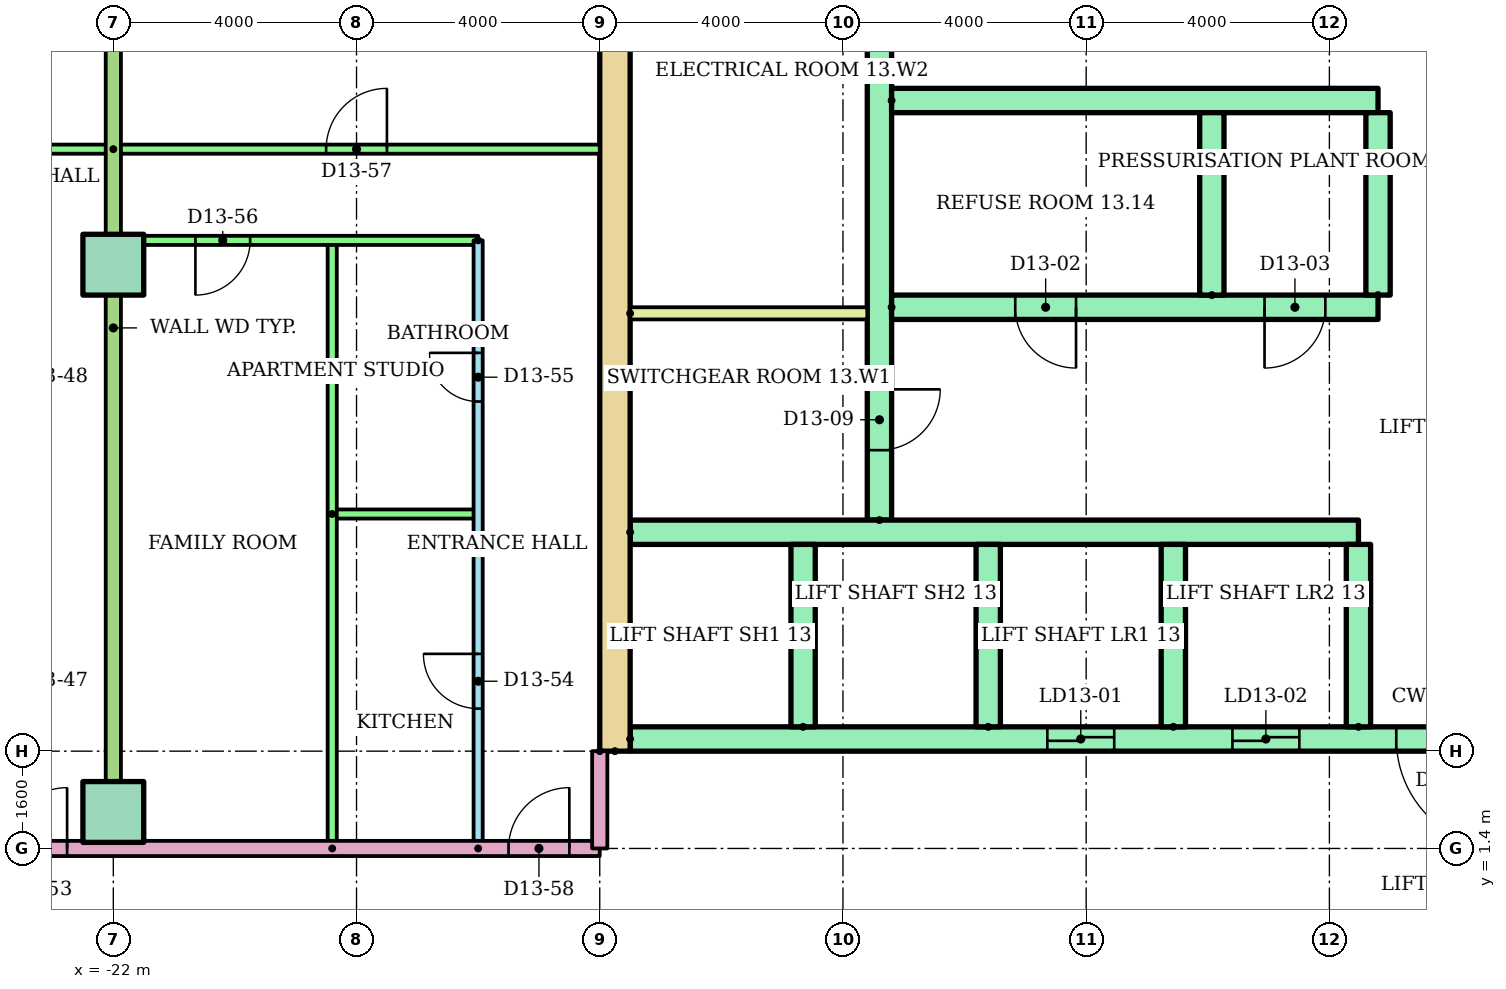
"""IFC4 building model, lengths in metres.
Left out: names, types, materials, properties, quantities, classifications, styles, units other than length and angle.
Written with IfcOpenShell. Run it as: python <this file> out.ifc"""

import sys

from ifc_helpers import new_model, si_unit, direction, frame, frame_2d, origin, origin_2d, place, context, subcontext, project, spatial, rectangle, extrude, element, fill, save


model = new_model("IFC4")
c1 = context("Model", 3, precision=1e-05, world=origin(), true_north=direction((0.0, 1.0)))
c2 = subcontext(c1, "Body", "Model", "MODEL_VIEW")
j1 = project(units=[si_unit("LENGTHUNIT", "METRE"), si_unit("PLANEANGLEUNIT", "RADIAN")], contexts=[c1])
p1 = place(None, origin())
s1 = spatial("IfcSite", under=j1, at=p1, CompositionType="ELEMENT")
p2 = place(p1, origin())
s2 = spatial("IfcBuilding", under=s1, at=p2, CompositionType="ELEMENT")
p3 = place(p2, frame((0.0, 0.0, 51.2)))
s3 = spatial("IfcBuildingStorey", under=s2, at=p3, CompositionType="ELEMENT", Elevation=51.2)
for number, where in (
    (1, (-22.0, 2.0, 0.0)),
    (2, (-22.0, 11.0, 0.0)),
):
    element("IfcColumn", number, at=place(p3, frame(where)), inside=s3, PredefinedType="COLUMN", context=c2, shape_type="SweptSolid", body=[
        extrude(rectangle(XDim=1.0, YDim=1.0, at=origin_2d()), origin(), (0.0, 0.0, 1.0), 3.2),
    ])
p4 = place(p3, frame((-13.75, 3.0, 0.0), z_axis=(0.0, 0.0, 1.0), x_axis=(0.0, 1.0, 0.0)))
e3 = element("IfcWall", 3, at=p4, inside=s3, PredefinedType="SHEAR", context=c2, shape_type="SweptSolid", body=[
    extrude(rectangle(XDim=17.0, YDim=0.5, at=frame_2d((8.5, 0.0))), origin(), (0.0, 0.0, 1.0), 2.92),
])
p5 = place(p3, frame((-9.4, 6.8, 0.0), z_axis=(0.0, 0.0, 1.0), x_axis=(0.0, 1.0, 0.0)))
e4 = element("IfcWall", 4, at=p5, inside=s3, PredefinedType="SHEAR", context=c2, shape_type="SweptSolid", body=[
    extrude(rectangle(XDim=12.7, YDim=0.4, at=frame_2d((6.35, 0.0))), origin(), (0.0, 0.0, 1.0), 2.92),
])
p6 = place(p5, frame((1.15, 0.0, 0.0)))
e5 = element("IfcOpeningElement", 5, at=p6, cuts=e4, PredefinedType="OPENING", context=c2, shape_type="SweptSolid", body=[
    extrude(rectangle(XDim=1.0, YDim=2.1, at=frame_2d((0.5, 1.05))), frame((0.0, 0.21, 0.0), z_axis=(0.0, -1.0, 0.0), x_axis=(1.0, 0.0, 0.0)), (0.0, 0.0, 1.0), 0.42),
])
p7 = place(p5, frame((7.925, 0.0, 0.0)))
e6 = element("IfcOpeningElement", 6, at=p7, cuts=e4, PredefinedType="OPENING", context=c2, shape_type="SweptSolid", body=[
    extrude(rectangle(XDim=1.0, YDim=2.1, at=frame_2d((0.5, 1.05))), frame((0.0, 0.21, 0.0), z_axis=(0.0, -1.0, 0.0), x_axis=(1.0, 0.0, 0.0)), (0.0, 0.0, 1.0), 0.42),
])
p8 = place(p3, frame((-13.5, 3.2, 0.0)))
e7 = element("IfcWall", 7, at=p8, inside=s3, PredefinedType="SHEAR", context=c2, shape_type="SweptSolid", body=[
    extrude(rectangle(XDim=27.0, YDim=0.4, at=frame_2d((13.5, 0.0))), origin(), (0.0, 0.0, 1.0), 2.92),
])
p9 = place(p8, frame((6.861, 0.0, 0.0)))
e8 = element("IfcOpeningElement", 8, at=p9, cuts=e7, PredefinedType="OPENING", context=c2, shape_type="SweptSolid", body=[
    extrude(rectangle(XDim=1.1, YDim=2.1, at=frame_2d((0.55, 1.05))), frame((0.0, 0.21, 0.0), z_axis=(0.0, -1.0, 0.0), x_axis=(1.0, 0.0, 0.0)), (0.0, 0.0, 1.0), 0.42),
])
p10 = place(p8, frame((9.906, 0.0, 0.0)))
e9 = element("IfcOpeningElement", 9, at=p10, cuts=e7, PredefinedType="OPENING", context=c2, shape_type="SweptSolid", body=[
    extrude(rectangle(XDim=1.1, YDim=2.1, at=frame_2d((0.55, 1.05))), frame((0.0, 0.21, 0.0), z_axis=(0.0, -1.0, 0.0), x_axis=(1.0, 0.0, 0.0)), (0.0, 0.0, 1.0), 0.42),
])
p11 = place(p8, frame((15.994, 0.0, 0.0)))
e10 = element("IfcOpeningElement", 10, at=p11, cuts=e7, PredefinedType="OPENING", context=c2, shape_type="SweptSolid", body=[
    extrude(rectangle(XDim=1.1, YDim=2.1, at=frame_2d((0.55, 1.05))), frame((0.0, 0.21, 0.0), z_axis=(0.0, -1.0, 0.0), x_axis=(1.0, 0.0, 0.0)), (0.0, 0.0, 1.0), 0.42),
])
p12 = place(p8, frame((19.039, 0.0, 0.0)))
e11 = element("IfcOpeningElement", 11, at=p12, cuts=e7, PredefinedType="OPENING", context=c2, shape_type="SweptSolid", body=[
    extrude(rectangle(XDim=1.1, YDim=2.1, at=frame_2d((0.55, 1.05))), frame((0.0, 0.21, 0.0), z_axis=(0.0, -1.0, 0.0), x_axis=(1.0, 0.0, 0.0)), (0.0, 0.0, 1.0), 0.42),
])
p13 = place(p8, frame((12.6, 0.0, 0.0)))
e12 = element("IfcOpeningElement", 12, at=p13, cuts=e7, PredefinedType="OPENING", context=c2, shape_type="SweptSolid", body=[
    extrude(rectangle(XDim=1.8, YDim=2.1, at=frame_2d((0.9, 1.05))), frame((0.0, 0.21, 0.0), z_axis=(0.0, -1.0, 0.0), x_axis=(1.0, 0.0, 0.0)), (0.0, 0.0, 1.0), 0.42),
])
p14 = place(p3, frame((-13.5, 6.6, 0.0)))
e13 = element("IfcWall", 13, at=p14, inside=s3, PredefinedType="SHEAR", context=c2, shape_type="SweptSolid", body=[
    extrude(rectangle(XDim=11.978, YDim=0.4, at=frame_2d((5.989, 0.0))), origin(), (0.0, 0.0, 1.0), 2.92),
])
for number, where, z_axis, x_axis in (
    (14, (-10.656, 3.4, 0.0), (0.0, 0.0, 1.0), (0.0, 1.0, 0.0)),
    (15, (-7.611, 3.4, 0.0), (0.0, 0.0, 1.0), (0.0, 1.0, 0.0)),
    (16, (-4.567, 3.4, 0.0), (0.0, 0.0, 1.0), (0.0, 1.0, 0.0)),
    (17, (-1.522, 3.4, 0.0), (0.0, 0.0, 1.0), (0.0, 1.0, 0.0)),
):
    element("IfcWall", number, at=place(p3, frame(where, z_axis=z_axis, x_axis=x_axis)), inside=s3, PredefinedType="SHEAR", context=c2, shape_type="SweptSolid", body=[
        extrude(rectangle(XDim=3.0, YDim=0.4, at=frame_2d((1.5, 0.0))), origin(), (0.0, 0.0, 1.0), 2.92),
    ])
p15 = place(p3, frame((-9.2, 10.3, 0.0)))
e18 = element("IfcWall", 18, at=p15, inside=s3, PredefinedType="SHEAR", context=c2, shape_type="SweptSolid", body=[
    extrude(rectangle(XDim=8.0, YDim=0.4, at=frame_2d((4.0, 0.0))), origin(), (0.0, 0.0, 1.0), 2.92),
])
p16 = place(p15, frame((2.033, 0.0, 0.0)))
e19 = element("IfcOpeningElement", 19, at=p16, cuts=e18, PredefinedType="OPENING", context=c2, shape_type="SweptSolid", body=[
    extrude(rectangle(XDim=1.0, YDim=2.1, at=frame_2d((0.5, 1.05))), frame((0.0, 0.21, 0.0), z_axis=(0.0, -1.0, 0.0), x_axis=(1.0, 0.0, 0.0)), (0.0, 0.0, 1.0), 0.42),
])
p17 = place(p15, frame((6.133, 0.0, 0.0)))
e20 = element("IfcOpeningElement", 20, at=p17, cuts=e18, PredefinedType="OPENING", context=c2, shape_type="SweptSolid", body=[
    extrude(rectangle(XDim=1.0, YDim=2.1, at=frame_2d((0.5, 1.05))), frame((0.0, 0.21, 0.0), z_axis=(0.0, -1.0, 0.0), x_axis=(1.0, 0.0, 0.0)), (0.0, 0.0, 1.0), 0.42),
])
p18 = place(p3, frame((-9.2, 13.7, 0.0)))
e21 = element("IfcWall", 21, at=p18, inside=s3, PredefinedType="SHEAR", context=c2, shape_type="SweptSolid", body=[
    extrude(rectangle(XDim=8.0, YDim=0.4, at=frame_2d((4.0, 0.0))), origin(), (0.0, 0.0, 1.0), 2.92),
])
for number, where, z_axis, x_axis in (
    (22, (-3.933, 10.5, 0.0), (0.0, 0.0, 1.0), (0.0, 1.0, 0.0)),
    (23, (-1.2, 10.5, 0.0), (0.0, 0.0, 1.0), (0.0, 1.0, 0.0)),
):
    element("IfcWall", number, at=place(p3, frame(where, z_axis=z_axis, x_axis=x_axis)), inside=s3, PredefinedType="SHEAR", context=c2, shape_type="SweptSolid", body=[
        extrude(rectangle(XDim=3.0, YDim=0.4, at=frame_2d((1.5, 0.0))), origin(), (0.0, 0.0, 1.0), 2.92),
    ])
p19 = place(p3, frame((-13.5, 10.2, 0.0)))
e24 = element("IfcWall", 24, at=p19, inside=s3, PredefinedType="PARTITIONING", context=c2, shape_type="SweptSolid", body=[
    extrude(rectangle(XDim=3.9, YDim=0.2, at=frame_2d((1.95, 0.0))), origin(), (0.0, 0.0, 1.0), 2.92),
])
p20 = place(p3, frame((-36.52, 12.9, 0.0)))
e25 = element("IfcWall", 25, at=p20, inside=s3, PredefinedType="PARTITIONING", context=c2, shape_type="SweptSolid", body=[
    extrude(rectangle(XDim=14.52, YDim=0.15, at=frame_2d((7.26, 0.0))), origin(), (0.0, 0.0, 1.0), 2.4),
])
p21 = place(p20, frame((1.97, 0.0, 0.0)))
e26 = element("IfcOpeningElement", 26, at=p21, cuts=e25, PredefinedType="OPENING", context=c2, shape_type="SweptSolid", body=[
    extrude(rectangle(XDim=1.0, YDim=2.1, at=frame_2d((0.5, 1.05))), frame((0.0, 0.085, 0.0), z_axis=(0.0, -1.0, 0.0), x_axis=(1.0, 0.0, 0.0)), (0.0, 0.0, 1.0), 0.17),
])
p22 = place(p20, frame((9.12, 0.0, 0.0)))
e27 = element("IfcOpeningElement", 27, at=p22, cuts=e25, PredefinedType="OPENING", context=c2, shape_type="SweptSolid", body=[
    extrude(rectangle(XDim=1.0, YDim=2.1, at=frame_2d((0.5, 1.05))), frame((0.0, 0.085, 0.0), z_axis=(0.0, -1.0, 0.0), x_axis=(1.0, 0.0, 0.0)), (0.0, 0.0, 1.0), 0.17),
])
p23 = place(p3, frame((-16.0, 1.4, 0.0), z_axis=(0.0, 0.0, 1.0), x_axis=(0.0, 1.0, 0.0)))
e28 = element("IfcWall", 28, at=p23, inside=s3, PredefinedType="PARTITIONING", context=c2, shape_type="SweptSolid", body=[
    extrude(rectangle(XDim=10.0, YDim=0.15, at=frame_2d((5.0, 0.0))), origin(), (0.0, 0.0, 1.0), 2.4),
])
p24 = place(p23, frame((2.3, 0.0, 0.0)))
e29 = element("IfcOpeningElement", 29, at=p24, cuts=e28, PredefinedType="OPENING", context=c2, shape_type="SweptSolid", body=[
    extrude(rectangle(XDim=0.9, YDim=2.1, at=frame_2d((0.45, 1.05))), frame((0.0, 0.085, 0.0), z_axis=(0.0, -1.0, 0.0), x_axis=(1.0, 0.0, 0.0)), (0.0, 0.0, 1.0), 0.17),
])
p25 = place(p23, frame((7.35, 0.0, 0.0)))
e30 = element("IfcOpeningElement", 30, at=p25, cuts=e28, PredefinedType="OPENING", context=c2, shape_type="SweptSolid", body=[
    extrude(rectangle(XDim=0.8, YDim=2.1, at=frame_2d((0.4, 1.05))), frame((0.0, 0.085, 0.0), z_axis=(0.0, -1.0, 0.0), x_axis=(1.0, 0.0, 0.0)), (0.0, 0.0, 1.0), 0.17),
])
p26 = place(p3, frame((-18.4, 6.9, 0.0)))
e31 = element("IfcWall", 31, at=p26, inside=s3, PredefinedType="PARTITIONING", context=c2, shape_type="SweptSolid", body=[
    extrude(rectangle(XDim=2.4, YDim=0.15, at=frame_2d((1.2, 0.0))), origin(), (0.0, 0.0, 1.0), 2.4),
])
p27 = place(p3, frame((-18.4, 1.4, 0.0), z_axis=(0.0, 0.0, 1.0), x_axis=(0.0, 1.0, 0.0)))
e32 = element("IfcWall", 32, at=p27, inside=s3, PredefinedType="PARTITIONING", context=c2, shape_type="SweptSolid", body=[
    extrude(rectangle(XDim=10.0, YDim=0.15, at=frame_2d((5.0, 0.0))), origin(), (0.0, 0.0, 1.0), 2.4),
])
p28 = place(p3, frame((-16.0, 11.4, 0.0), z_axis=(0.0, 0.0, 1.0), x_axis=(-1.0, 0.0, 0.0)))
e33 = element("IfcWall", 33, at=p28, inside=s3, PredefinedType="PARTITIONING", context=c2, shape_type="SweptSolid", body=[
    extrude(rectangle(XDim=6.0, YDim=0.15, at=frame_2d((3.0, 0.0))), origin(), (0.0, 0.0, 1.0), 2.4),
])
p29 = place(p28, frame((3.75, 0.0, 0.0)))
e34 = element("IfcOpeningElement", 34, at=p29, cuts=e33, PredefinedType="OPENING", context=c2, shape_type="SweptSolid", body=[
    extrude(rectangle(XDim=0.9, YDim=2.1, at=frame_2d((0.45, 1.05))), frame((0.0, 0.085, 0.0), z_axis=(0.0, -1.0, 0.0), x_axis=(1.0, 0.0, 0.0)), (0.0, 0.0, 1.0), 0.17),
])
p30 = place(p3, frame((-22.0, 12.9, 0.0)))
e35 = element("IfcWall", 35, at=p30, inside=s3, PredefinedType="PARTITIONING", context=c2, shape_type="SweptSolid", body=[
    extrude(rectangle(XDim=8.0, YDim=0.15, at=frame_2d((4.0, 0.0))), origin(), (0.0, 0.0, 1.0), 2.4),
])
p31 = place(p30, frame((3.5, 0.0, 0.0)))
e36 = element("IfcOpeningElement", 36, at=p31, cuts=e35, PredefinedType="OPENING", context=c2, shape_type="SweptSolid", body=[
    extrude(rectangle(XDim=1.0, YDim=2.1, at=frame_2d((0.5, 1.05))), frame((0.0, 0.085, 0.0), z_axis=(0.0, -1.0, 0.0), x_axis=(1.0, 0.0, 0.0)), (0.0, 0.0, 1.0), 0.17),
])
p32 = place(p3, frame((-22.0, 18.521, 0.0), z_axis=(0.0, 0.0, 1.0), x_axis=(0.0, -1.0, 0.0)))
e37 = element("IfcWall", 37, at=p32, inside=s3, PredefinedType="PARTITIONING", context=c2, shape_type="SweptSolid", body=[
    extrude(rectangle(XDim=17.121, YDim=0.25, at=frame_2d((8.561, 0.0))), origin(), (0.0, 0.0, 1.0), 2.4),
])
p33 = place(p3, frame((-29.0, 1.4, 0.0)))
e38 = element("IfcWall", 38, at=p33, inside=s3, PredefinedType="PARTITIONING", context=c2, shape_type="SweptSolid", body=[
    extrude(rectangle(XDim=15.0, YDim=0.25, at=frame_2d((7.5, 0.0))), origin(), (0.0, 0.0, 1.0), 2.4),
])
p34 = place(p33, frame((5.24, 0.0, 0.0)))
e39 = element("IfcOpeningElement", 39, at=p34, cuts=e38, PredefinedType="OPENING", context=c2, shape_type="SweptSolid", body=[
    extrude(rectangle(XDim=1.0, YDim=2.1, at=frame_2d((0.5, 1.05))), frame((0.0, 0.135, 0.0), z_axis=(0.0, -1.0, 0.0), x_axis=(1.0, 0.0, 0.0)), (0.0, 0.0, 1.0), 0.27),
])
p35 = place(p33, frame((13.5, 0.0, 0.0)))
e40 = element("IfcOpeningElement", 40, at=p35, cuts=e38, PredefinedType="OPENING", context=c2, shape_type="SweptSolid", body=[
    extrude(rectangle(XDim=1.0, YDim=2.1, at=frame_2d((0.5, 1.05))), frame((0.0, 0.135, 0.0), z_axis=(0.0, -1.0, 0.0), x_axis=(1.0, 0.0, 0.0)), (0.0, 0.0, 1.0), 0.27),
])
p36 = place(p3, frame((-14.0, 3.0, 0.0), z_axis=(0.0, 0.0, 1.0), x_axis=(0.0, -1.0, 0.0)))
e41 = element("IfcWall", 41, at=p36, inside=s3, PredefinedType="PARTITIONING", context=c2, shape_type="SweptSolid", body=[
    extrude(rectangle(XDim=1.6, YDim=0.25, at=frame_2d((0.8, 0.0))), origin(), (0.0, 0.0, 1.0), 2.4),
])
p37 = place(p9, origin())
e42 = element("IfcDoor", 42, at=p37, inside=s3, OperationType="SLIDING_TO_LEFT", PredefinedType="DOOR", context=c2, shape_type="SweptSolid", body=[
    extrude(rectangle(XDim=1.1, YDim=2.1, at=frame_2d((0.55, 1.05))), frame((0.0, 0.025, 0.0), z_axis=(0.0, -1.0, 0.0), x_axis=(1.0, 0.0, 0.0)), (0.0, 0.0, 1.0), 0.05),
])
fill(e8, e42)
p38 = place(p10, origin())
e43 = element("IfcDoor", 43, at=p38, inside=s3, OperationType="SLIDING_TO_LEFT", PredefinedType="DOOR", context=c2, shape_type="SweptSolid", body=[
    extrude(rectangle(XDim=1.1, YDim=2.1, at=frame_2d((0.55, 1.05))), frame((0.0, 0.025, 0.0), z_axis=(0.0, -1.0, 0.0), x_axis=(1.0, 0.0, 0.0)), (0.0, 0.0, 1.0), 0.05),
])
fill(e9, e43)
p39 = place(p13, frame((1.8, 0.0, 0.0), z_axis=(0.0, 0.0, 1.0), x_axis=(-1.0, 0.0, 0.0)))
e44 = element("IfcDoor", 44, at=p39, inside=s3, OperationType="DOUBLE_DOOR_SINGLE_SWING", PredefinedType="DOOR", context=c2, shape_type="SweptSolid", body=[
    extrude(rectangle(XDim=1.8, YDim=2.1, at=frame_2d((0.9, 1.05))), frame((0.0, 0.025, 0.0), z_axis=(0.0, -1.0, 0.0), x_axis=(1.0, 0.0, 0.0)), (0.0, 0.0, 1.0), 0.05),
])
fill(e12, e44)
p40 = place(p16, frame((1.0, 0.0, 0.0), z_axis=(0.0, 0.0, 1.0), x_axis=(-1.0, 0.0, 0.0)))
e45 = element("IfcDoor", 45, at=p40, inside=s3, OperationType="SINGLE_SWING_RIGHT", PredefinedType="DOOR", context=c2, shape_type="SweptSolid", body=[
    extrude(rectangle(XDim=1.0, YDim=2.1, at=frame_2d((0.5, 1.05))), frame((0.0, 0.025, 0.0), z_axis=(0.0, -1.0, 0.0), x_axis=(1.0, 0.0, 0.0)), (0.0, 0.0, 1.0), 0.05),
])
fill(e19, e45)
p41 = place(p17, frame((1.0, 0.0, 0.0), z_axis=(0.0, 0.0, 1.0), x_axis=(-1.0, 0.0, 0.0)))
e46 = element("IfcDoor", 46, at=p41, inside=s3, OperationType="SINGLE_SWING_LEFT", PredefinedType="DOOR", context=c2, shape_type="SweptSolid", body=[
    extrude(rectangle(XDim=1.0, YDim=2.1, at=frame_2d((0.5, 1.05))), frame((0.0, 0.025, 0.0), z_axis=(0.0, -1.0, 0.0), x_axis=(1.0, 0.0, 0.0)), (0.0, 0.0, 1.0), 0.05),
])
fill(e20, e46)
p42 = place(p6, frame((1.0, 0.0, 0.0), z_axis=(0.0, 0.0, 1.0), x_axis=(-1.0, 0.0, 0.0)))
e47 = element("IfcDoor", 47, at=p42, inside=s3, OperationType="SINGLE_SWING_RIGHT", PredefinedType="DOOR", context=c2, shape_type="SweptSolid", body=[
    extrude(rectangle(XDim=1.0, YDim=2.1, at=frame_2d((0.5, 1.05))), frame((0.0, 0.025, 0.0), z_axis=(0.0, -1.0, 0.0), x_axis=(1.0, 0.0, 0.0)), (0.0, 0.0, 1.0), 0.05),
])
fill(e5, e47)
p43 = place(p34, origin())
e48 = element("IfcDoor", 48, at=p43, inside=s3, OperationType="SINGLE_SWING_RIGHT", PredefinedType="DOOR", context=c2, shape_type="SweptSolid", body=[
    extrude(rectangle(XDim=1.0, YDim=2.1, at=frame_2d((0.5, 1.05))), frame((0.0, 0.025, 0.0), z_axis=(0.0, -1.0, 0.0), x_axis=(1.0, 0.0, 0.0)), (0.0, 0.0, 1.0), 0.05),
])
fill(e39, e48)
p44 = place(p24, origin())
e49 = element("IfcDoor", 49, at=p44, inside=s3, OperationType="SINGLE_SWING_RIGHT", PredefinedType="DOOR", context=c2, shape_type="SweptSolid", body=[
    extrude(rectangle(XDim=0.9, YDim=2.1, at=frame_2d((0.45, 1.05))), frame((0.0, 0.025, 0.0), z_axis=(0.0, -1.0, 0.0), x_axis=(1.0, 0.0, 0.0)), (0.0, 0.0, 1.0), 0.05),
])
fill(e29, e49)
p45 = place(p25, origin())
e50 = element("IfcDoor", 50, at=p45, inside=s3, OperationType="SINGLE_SWING_RIGHT", PredefinedType="DOOR", context=c2, shape_type="SweptSolid", body=[
    extrude(rectangle(XDim=0.8, YDim=2.1, at=frame_2d((0.4, 1.05))), frame((0.0, 0.025, 0.0), z_axis=(0.0, -1.0, 0.0), x_axis=(1.0, 0.0, 0.0)), (0.0, 0.0, 1.0), 0.05),
])
fill(e30, e50)
p46 = place(p29, origin())
e51 = element("IfcDoor", 51, at=p46, inside=s3, OperationType="SINGLE_SWING_RIGHT", PredefinedType="DOOR", context=c2, shape_type="SweptSolid", body=[
    extrude(rectangle(XDim=0.9, YDim=2.1, at=frame_2d((0.45, 1.05))), frame((0.0, 0.025, 0.0), z_axis=(0.0, -1.0, 0.0), x_axis=(1.0, 0.0, 0.0)), (0.0, 0.0, 1.0), 0.05),
])
fill(e34, e51)
p47 = place(p31, origin())
e52 = element("IfcDoor", 52, at=p47, inside=s3, OperationType="SINGLE_SWING_RIGHT", PredefinedType="DOOR", context=c2, shape_type="SweptSolid", body=[
    extrude(rectangle(XDim=1.0, YDim=2.1, at=frame_2d((0.5, 1.05))), frame((0.0, 0.025, 0.0), z_axis=(0.0, -1.0, 0.0), x_axis=(1.0, 0.0, 0.0)), (0.0, 0.0, 1.0), 0.05),
])
fill(e36, e52)
p48 = place(p35, origin())
e53 = element("IfcDoor", 53, at=p48, inside=s3, OperationType="SINGLE_SWING_RIGHT", PredefinedType="DOOR", context=c2, shape_type="SweptSolid", body=[
    extrude(rectangle(XDim=1.0, YDim=2.1, at=frame_2d((0.5, 1.05))), frame((0.0, 0.025, 0.0), z_axis=(0.0, -1.0, 0.0), x_axis=(1.0, 0.0, 0.0)), (0.0, 0.0, 1.0), 0.05),
])
fill(e40, e53)
save(model, sys.argv[1])
